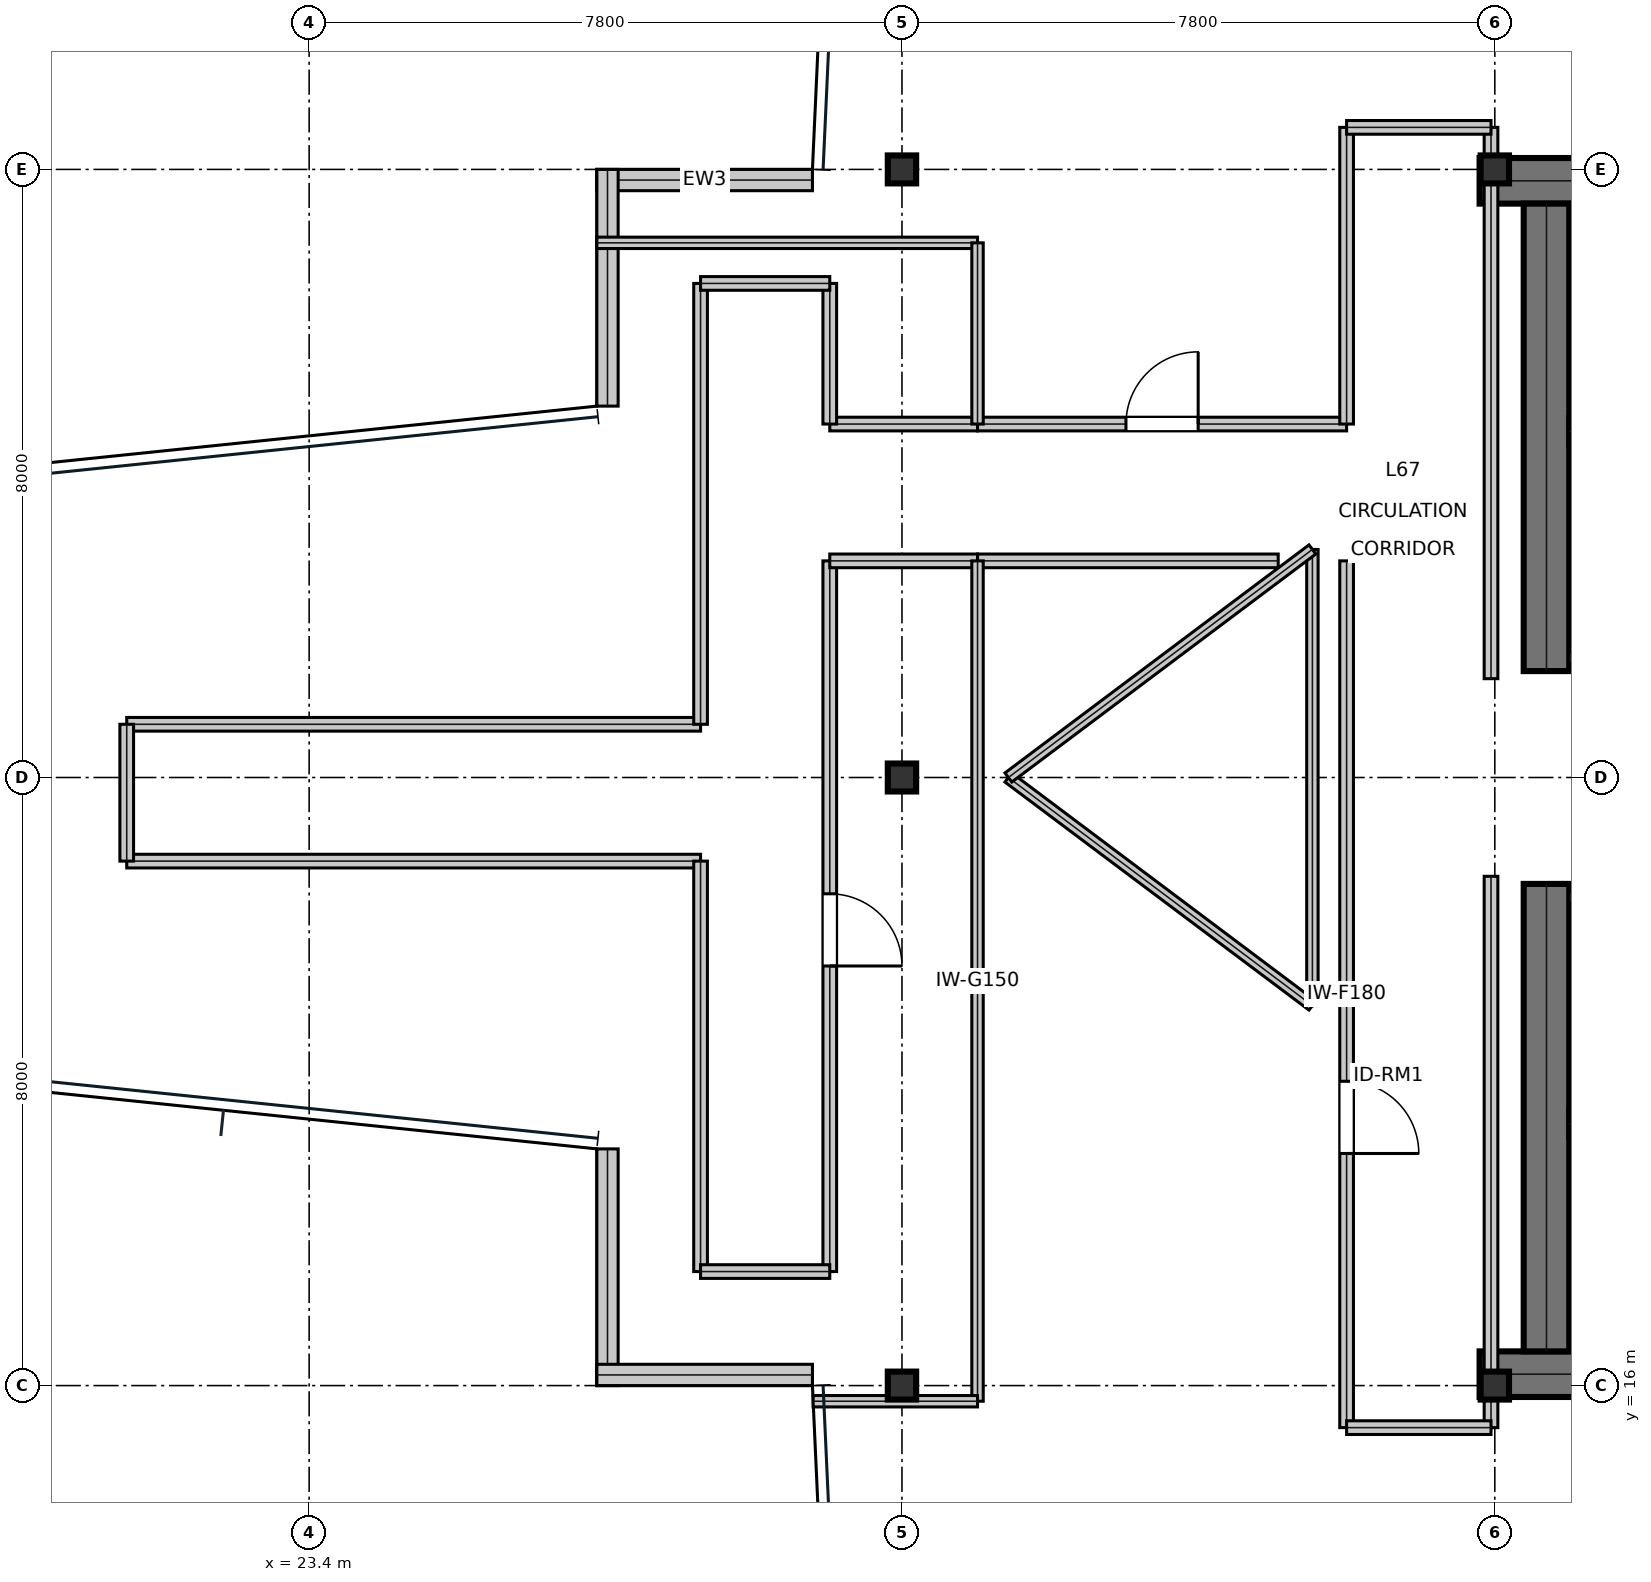
"""IFC4 building model, lengths in metres.
Left out: names, types, materials, properties, quantities, classifications, styles, units other than length and angle.
Written with IfcOpenShell. Run it as: python <this file> out.ifc"""

import sys

from ifc_helpers import new_model, si_unit, direction, frame, frame_2d, origin, origin_2d, place, context, subcontext, project, spatial, rectangle, i_section, extrude, element, fill, save


model = new_model("IFC4")
c1 = context("Model", 3, precision=1e-05, world=origin(), true_north=direction((0.0, 1.0)))
c2 = subcontext(c1, "Body", "Model", "MODEL_VIEW")
j1 = project(units=[si_unit("LENGTHUNIT", "METRE"), si_unit("PLANEANGLEUNIT", "RADIAN")], contexts=[c1])
p1 = place(None, origin())
s1 = spatial("IfcSite", under=j1, at=p1, CompositionType="ELEMENT")
p2 = place(p1, origin())
s2 = spatial("IfcBuilding", under=s1, at=p2, CompositionType="ELEMENT")
p3 = place(p2, frame((0.0, 0.0, 287.1)))
s3 = spatial("IfcBuildingStorey", under=s2, at=p3, CompositionType="ELEMENT", Elevation=287.1)
for number, where, z_axis, x_axis in (
    (1, (38.8, 31.85, 0.0), (0.0, 0.0, 1.0), (1.0, 0.0, 0.0)),
    (2, (38.8, 16.15, 0.0), (0.0, 0.0, 1.0), (1.0, 0.0, 0.0)),
):
    element("IfcWall", number, at=place(p3, frame(where, z_axis=z_axis, x_axis=x_axis)), inside=s3, PredefinedType="SHEAR", context=c2, shape_type="SweptSolid", body=[
        extrude(rectangle(XDim=16.0, YDim=0.6, at=frame_2d((8.0, 0.0))), origin(), (0.0, 0.0, 1.0), 3.81),
    ])
for number, where, z_axis, x_axis in (
    (3, (39.68, 16.45, 0.0), (0.0, 0.0, 1.0), (0.0, 1.0, 0.0)),
    (4, (39.68, 25.4, 0.0), (0.0, 0.0, 1.0), (0.0, 1.0, 0.0)),
):
    element("IfcWall", number, at=place(p3, frame(where, z_axis=z_axis, x_axis=x_axis)), inside=s3, PredefinedType="SHEAR", context=c2, shape_type="SweptSolid", body=[
        extrude(rectangle(XDim=6.15, YDim=0.6, at=frame_2d((3.075, 0.0))), origin(), (0.0, 0.0, 1.0), 3.81),
    ])
p4 = place(p3, frame((39.98, 28.555, 0.0), z_axis=(0.0, 0.0, 1.0), x_axis=(1.0, 0.0, 0.0)))
e5 = element("IfcWall", 5, at=p4, inside=s3, PredefinedType="SHEAR", context=c2, shape_type="SweptSolid", body=[
    extrude(rectangle(XDim=7.71, YDim=0.35, at=frame_2d((3.855, 0.0))), origin(), (0.0, 0.0, 1.0), 3.81),
])
p5 = place(p4, frame((0.25, 0.0, 0.0)))
e6 = element("IfcOpeningElement", 6, at=p5, cuts=e5, PredefinedType="OPENING", context=c2, shape_type="SweptSolid", body=[
    extrude(rectangle(XDim=1.1, YDim=2.15, at=frame_2d((0.55, 1.075))), frame((0.0, 0.185, 0.0), z_axis=(0.0, -1.0, 0.0), x_axis=(1.0, 0.0, 0.0)), (0.0, 0.0, 1.0), 0.37),
])
p6 = place(p3, frame((39.98, 19.445, 0.0), z_axis=(0.0, 0.0, 1.0), x_axis=(1.0, 0.0, 0.0)))
e7 = element("IfcWall", 7, at=p6, inside=s3, PredefinedType="SHEAR", context=c2, shape_type="SweptSolid", body=[
    extrude(rectangle(XDim=7.71, YDim=0.35, at=frame_2d((3.855, 0.0))), origin(), (0.0, 0.0, 1.0), 3.81),
])
p7 = place(p6, frame((0.25, 0.0, 0.0)))
e8 = element("IfcOpeningElement", 8, at=p7, cuts=e7, PredefinedType="OPENING", context=c2, shape_type="SweptSolid", body=[
    extrude(rectangle(XDim=1.1, YDim=2.15, at=frame_2d((0.55, 1.075))), frame((0.0, 0.185, 0.0), z_axis=(0.0, -1.0, 0.0), x_axis=(1.0, 0.0, 0.0)), (0.0, 0.0, 1.0), 0.37),
])
for number, where, z_axis, x_axis in (
    (9, (31.2, 16.0, 0.0), (0.0, 0.0, 1.0), (1.0, 0.0, 0.0)),
    (10, (31.2, 24.0, 0.0), (0.0, 0.0, 1.0), (1.0, 0.0, 0.0)),
    (11, (31.2, 32.0, 0.0), (0.0, 0.0, 1.0), (1.0, 0.0, 0.0)),
    (12, (39.0, 16.0, 0.0), (0.0, 0.0, 1.0), (1.0, 0.0, 0.0)),
    (13, (39.0, 32.0, 0.0), (0.0, 0.0, 1.0), (1.0, 0.0, 0.0)),
):
    element("IfcColumn", number, at=place(p3, frame(where, z_axis=z_axis, x_axis=x_axis)), inside=s3, PredefinedType="COLUMN", context=c2, shape_type="SweptSolid", body=[
        extrude(i_section(OverallWidth=0.373, OverallDepth=0.368, WebThickness=0.015, FlangeThickness=0.024, at=origin_2d()), origin(), (0.0, 0.0, 1.0), 4.044),
    ])
p8 = place(p3, frame((30.022, 31.86, 0.0), z_axis=(0.0, 0.0, 1.0), x_axis=(-1.0, 0.0, 0.0)))
e14 = element("IfcWall", 14, at=p8, inside=s3, PredefinedType="STANDARD", context=c2, shape_type="SweptSolid", body=[
    extrude(rectangle(XDim=2.836, YDim=0.28, at=frame_2d((1.418, 0.0))), origin(), (0.0, 0.0, 1.0), 3.81),
])
for number, where, z_axis, x_axis in (
    (15, (27.326, 32.0, 0.0), (0.0, 0.0, 1.0), (0.0, -1.0, 0.0)),
    (16, (27.326, 19.114, 0.0), (0.0, 0.0, 1.0), (0.0, -1.0, 0.0)),
):
    element("IfcWall", number, at=place(p3, frame(where, z_axis=z_axis, x_axis=x_axis)), inside=s3, PredefinedType="STANDARD", context=c2, shape_type="SweptSolid", body=[
        extrude(rectangle(XDim=3.114, YDim=0.28, at=frame_2d((1.557, 0.0))), origin(), (0.0, 0.0, 1.0), 3.339),
    ])
p9 = place(p3, frame((27.186, 16.14, 0.0), z_axis=(0.0, 0.0, 1.0), x_axis=(1.0, 0.0, 0.0)))
e17 = element("IfcWall", 17, at=p9, inside=s3, PredefinedType="STANDARD", context=c2, shape_type="SweptSolid", body=[
    extrude(rectangle(XDim=2.836, YDim=0.28, at=frame_2d((1.418, 0.0))), origin(), (0.0, 0.0, 1.0), 3.81),
])
p10 = place(p3, frame((39.98, 25.575, 0.0), z_axis=(0.0, 0.0, 1.0), x_axis=(1.0, 0.0, 0.0)))
e18 = element("IfcWall", 18, at=p10, inside=s3, PredefinedType="PARTITIONING", context=c2, shape_type="SweptSolid", body=[
    extrude(rectangle(XDim=5.9, YDim=0.15, at=frame_2d((2.95, 0.0))), origin(), (0.0, 0.0, 1.0), 3.81),
])
p11 = place(p10, frame((2.35, 0.0, 0.0)))
e19 = element("IfcOpeningElement", 19, at=p11, cuts=e18, PredefinedType="OPENING", context=c2, shape_type="SweptSolid", body=[
    extrude(rectangle(XDim=1.05, YDim=2.15, at=frame_2d((0.525, 1.075))), frame((0.0, 0.085, 0.0), z_axis=(0.0, -1.0, 0.0), x_axis=(1.0, 0.0, 0.0)), (0.0, 0.0, 1.0), 0.17),
])
p12 = place(p3, frame((39.98, 22.425, 0.0), z_axis=(0.0, 0.0, 1.0), x_axis=(1.0, 0.0, 0.0)))
e20 = element("IfcWall", 20, at=p12, inside=s3, PredefinedType="PARTITIONING", context=c2, shape_type="SweptSolid", body=[
    extrude(rectangle(XDim=5.9, YDim=0.15, at=frame_2d((2.95, 0.0))), origin(), (0.0, 0.0, 1.0), 3.81),
])
p13 = place(p12, frame((2.35, 0.0, 0.0)))
e21 = element("IfcOpeningElement", 21, at=p13, cuts=e20, PredefinedType="OPENING", context=c2, shape_type="SweptSolid", body=[
    extrude(rectangle(XDim=1.05, YDim=2.15, at=frame_2d((0.525, 1.075))), frame((0.0, 0.085, 0.0), z_axis=(0.0, -1.0, 0.0), x_axis=(1.0, 0.0, 0.0)), (0.0, 0.0, 1.0), 0.17),
])
p14 = place(p3, frame((37.05, 15.447, 0.0), z_axis=(0.0, 0.0, 1.0), x_axis=(0.0, 1.0, 0.0)))
e22 = element("IfcWall", 22, at=p14, inside=s3, PredefinedType="SOLIDWALL", context=c2, shape_type="SweptSolid", body=[
    extrude(rectangle(XDim=11.403, YDim=0.18, at=frame_2d((5.702, 0.0))), origin(), (0.0, 0.0, 1.0), 3.27),
])
p15 = place(p14, frame((3.607, 0.0, 0.0)))
e23 = element("IfcOpeningElement", 23, at=p15, cuts=e22, PredefinedType="OPENING", context=c2, shape_type="SweptSolid", body=[
    extrude(rectangle(XDim=0.95, YDim=2.15, at=frame_2d((0.475, 1.075))), frame((0.0, 0.1, 0.0), z_axis=(0.0, -1.0, 0.0), x_axis=(1.0, 0.0, 0.0)), (0.0, 0.0, 1.0), 0.2),
])
p16 = place(p3, frame((30.25, 17.5, 0.0), z_axis=(0.0, 0.0, 1.0), x_axis=(0.0, 1.0, 0.0)))
e24 = element("IfcWall", 24, at=p16, inside=s3, PredefinedType="SOLIDWALL", context=c2, shape_type="SweptSolid", body=[
    extrude(rectangle(XDim=9.35, YDim=0.18, at=frame_2d((4.675, 0.0))), origin(), (0.0, 0.0, 1.0), 3.27),
])
p17 = place(p16, frame((4.02, 0.0, 0.0)))
e25 = element("IfcOpeningElement", 25, at=p17, cuts=e24, PredefinedType="OPENING", context=c2, shape_type="SweptSolid", body=[
    extrude(rectangle(XDim=0.95, YDim=2.15, at=frame_2d((0.475, 1.075))), frame((0.0, 0.1, 0.0), z_axis=(0.0, -1.0, 0.0), x_axis=(1.0, 0.0, 0.0)), (0.0, 0.0, 1.0), 0.2),
])
p18 = place(p3, frame((32.194, 28.65, 0.0), z_axis=(0.0, 0.0, 1.0), x_axis=(1.0, 0.0, 0.0)))
e26 = element("IfcWall", 26, at=p18, inside=s3, PredefinedType="SOLIDWALL", context=c2, shape_type="SweptSolid", body=[
    extrude(rectangle(XDim=4.856, YDim=0.18, at=frame_2d((2.428, 0.0))), origin(), (0.0, 0.0, 1.0), 3.81),
])
p19 = place(p18, frame((1.953, 0.0, 0.0)))
e27 = element("IfcOpeningElement", 27, at=p19, cuts=e26, PredefinedType="OPENING", context=c2, shape_type="SweptSolid", body=[
    extrude(rectangle(XDim=0.95, YDim=2.15, at=frame_2d((0.475, 1.075))), frame((0.0, 0.1, 0.0), z_axis=(0.0, -1.0, 0.0), x_axis=(1.0, 0.0, 0.0)), (0.0, 0.0, 1.0), 0.2),
])
p20 = place(p3, frame((38.95, 15.447, 0.0), z_axis=(0.0, 0.0, 1.0), x_axis=(0.0, 1.0, 0.0)))
e28 = element("IfcWall", 28, at=p20, inside=s3, PredefinedType="SOLIDWALL", context=c2, shape_type="SweptSolid", body=[
    extrude(rectangle(XDim=7.253, YDim=0.18, at=frame_2d((3.626, 0.0))), origin(), (0.0, 0.0, 1.0), 3.27),
])
p21 = place(p3, frame((32.194, 26.85, 0.0), z_axis=(0.0, 0.0, 1.0), x_axis=(1.0, 0.0, 0.0)))
e29 = element("IfcWall", 29, at=p21, inside=s3, PredefinedType="SOLIDWALL", context=c2, shape_type="SweptSolid", body=[
    extrude(rectangle(XDim=3.956, YDim=0.18, at=frame_2d((1.978, 0.0))), origin(), (0.0, 0.0, 1.0), 3.81),
])
p22 = place(p3, frame((37.05, 15.447, 0.0), z_axis=(0.0, 0.0, 1.0), x_axis=(1.0, 0.0, 0.0)))
e30 = element("IfcWall", 30, at=p22, inside=s3, PredefinedType="SOLIDWALL", context=c2, shape_type="SweptSolid", body=[
    extrude(rectangle(XDim=1.9, YDim=0.18, at=frame_2d((0.95, 0.0))), origin(), (0.0, 0.0, 1.0), 3.27),
])
for number, where, z_axis, x_axis in (
    (31, (21.0, 22.9, 0.0), (0.0, 0.0, 1.0), (1.0, 0.0, 0.0)),
    (32, (21.0, 24.7, 0.0), (0.0, 0.0, 1.0), (1.0, 0.0, 0.0)),
):
    element("IfcWall", number, at=place(p3, frame(where, z_axis=z_axis, x_axis=x_axis)), inside=s3, PredefinedType="SOLIDWALL", context=c2, shape_type="SweptSolid", body=[
        extrude(rectangle(XDim=7.55, YDim=0.18, at=frame_2d((3.775, 0.0))), origin(), (0.0, 0.0, 1.0), 3.27),
    ])
p23 = place(p3, frame((28.55, 24.7, 0.0), z_axis=(0.0, 0.0, 1.0), x_axis=(0.0, 1.0, 0.0)))
e33 = element("IfcWall", 33, at=p23, inside=s3, PredefinedType="SOLIDWALL", context=c2, shape_type="SweptSolid", body=[
    extrude(rectangle(XDim=5.8, YDim=0.18, at=frame_2d((2.9, 0.0))), origin(), (0.0, 0.0, 1.0), 3.81),
])
p24 = place(p3, frame((28.55, 17.5, 0.0), z_axis=(0.0, 0.0, 1.0), x_axis=(0.0, 1.0, 0.0)))
e34 = element("IfcWall", 34, at=p24, inside=s3, PredefinedType="SOLIDWALL", context=c2, shape_type="SweptSolid", body=[
    extrude(rectangle(XDim=5.4, YDim=0.18, at=frame_2d((2.7, 0.0))), origin(), (0.0, 0.0, 1.0), 3.81),
])
for number, where, z_axis, x_axis in (
    (35, (30.25, 26.85, 0.0), (0.0, 0.0, 1.0), (1.0, 0.0, 0.0)),
    (36, (30.25, 28.65, 0.0), (0.0, 0.0, 1.0), (1.0, 0.0, 0.0)),
):
    element("IfcWall", number, at=place(p3, frame(where, z_axis=z_axis, x_axis=x_axis)), inside=s3, PredefinedType="SOLIDWALL", context=c2, shape_type="SweptSolid", body=[
        extrude(rectangle(XDim=1.944, YDim=0.18, at=frame_2d((0.972, 0.0))), origin(), (0.0, 0.0, 1.0), 3.27),
    ])
p25 = place(p3, frame((30.25, 28.65, 0.0), z_axis=(0.0, 0.0, 1.0), x_axis=(0.0, 1.0, 0.0)))
e37 = element("IfcWall", 37, at=p25, inside=s3, PredefinedType="SOLIDWALL", context=c2, shape_type="SweptSolid", body=[
    extrude(rectangle(XDim=1.85, YDim=0.18, at=frame_2d((0.925, 0.0))), origin(), (0.0, 0.0, 1.0), 3.81),
])
p26 = place(p3, frame((21.0, 22.9, 0.0), z_axis=(0.0, 0.0, 1.0), x_axis=(0.0, 1.0, 0.0)))
e38 = element("IfcWall", 38, at=p26, inside=s3, PredefinedType="SOLIDWALL", context=c2, shape_type="SweptSolid", body=[
    extrude(rectangle(XDim=1.8, YDim=0.18, at=frame_2d((0.9, 0.0))), origin(), (0.0, 0.0, 1.0), 3.81),
])
for number, where, z_axis, x_axis in (
    (39, (28.55, 17.5, 0.0), (0.0, 0.0, 1.0), (1.0, 0.0, 0.0)),
    (40, (28.55, 30.5, 0.0), (0.0, 0.0, 1.0), (1.0, 0.0, 0.0)),
):
    element("IfcWall", number, at=place(p3, frame(where, z_axis=z_axis, x_axis=x_axis)), inside=s3, PredefinedType="SOLIDWALL", context=c2, shape_type="SweptSolid", body=[
        extrude(rectangle(XDim=1.7, YDim=0.18, at=frame_2d((0.85, 0.0))), origin(), (0.0, 0.0, 1.0), 3.81),
    ])
p27 = place(p3, frame((38.95, 25.3, 0.0), z_axis=(0.0, 0.0, 1.0), x_axis=(0.0, 1.0, 0.0)))
e41 = element("IfcWall", 41, at=p27, inside=s3, PredefinedType="SOLIDWALL", context=c2, shape_type="SweptSolid", body=[
    extrude(rectangle(XDim=7.253, YDim=0.18, at=frame_2d((3.626, 0.0))), origin(), (0.0, 0.0, 1.0), 3.27),
])
p28 = place(p3, frame((37.05, 28.65, 0.0), z_axis=(0.0, 0.0, 1.0), x_axis=(0.0, 1.0, 0.0)))
e42 = element("IfcWall", 42, at=p28, inside=s3, PredefinedType="SOLIDWALL", context=c2, shape_type="SweptSolid", body=[
    extrude(rectangle(XDim=3.903, YDim=0.18, at=frame_2d((1.952, 0.0))), origin(), (0.0, 0.0, 1.0), 3.27),
])
p29 = place(p3, frame((37.05, 32.553, 0.0), z_axis=(0.0, 0.0, 1.0), x_axis=(1.0, 0.0, 0.0)))
e43 = element("IfcWall", 43, at=p29, inside=s3, PredefinedType="SOLIDWALL", context=c2, shape_type="SweptSolid", body=[
    extrude(rectangle(XDim=1.9, YDim=0.18, at=frame_2d((0.95, 0.0))), origin(), (0.0, 0.0, 1.0), 3.27),
])
p30 = place(p3, frame((32.194, 15.794, 0.0), z_axis=(0.0, 0.0, 1.0), x_axis=(0.0, 1.0, 0.0)))
e44 = element("IfcWall", 44, at=p30, inside=s3, PredefinedType="MOVABLE", context=c2, shape_type="SweptSolid", body=[
    extrude(rectangle(XDim=11.056, YDim=0.15, at=frame_2d((5.528, 0.0))), origin(), (0.0, 0.0, 1.0), 3.27),
])
p31 = place(p3, frame((30.031, 15.794, 0.0), z_axis=(0.0, 0.0, 1.0), x_axis=(1.0, 0.0, 0.0)))
e45 = element("IfcWall", 45, at=p31, inside=s3, PredefinedType="MOVABLE", context=c2, shape_type="SweptSolid", body=[
    extrude(rectangle(XDim=2.163, YDim=0.15, at=frame_2d((1.081, 0.0))), origin(), (0.0, 0.0, 1.0), 3.27),
])
p32 = place(p3, frame((27.186, 31.034, 0.0), z_axis=(0.0, 0.0, 1.0), x_axis=(1.0, 0.0, 0.0)))
e46 = element("IfcWall", 46, at=p32, inside=s3, PredefinedType="MOVABLE", context=c2, shape_type="SweptSolid", body=[
    extrude(rectangle(XDim=5.009, YDim=0.15, at=frame_2d((2.504, 0.0))), origin(), (0.0, 0.0, 1.0), 3.27),
])
p33 = place(p3, frame((32.194, 28.65, 0.0), z_axis=(0.0, 0.0, 1.0), x_axis=(0.0, 1.0, 0.0)))
e47 = element("IfcWall", 47, at=p33, inside=s3, PredefinedType="MOVABLE", context=c2, shape_type="SweptSolid", body=[
    extrude(rectangle(XDim=2.384, YDim=0.15, at=frame_2d((1.192, 0.0))), origin(), (0.0, 0.0, 1.0), 3.54),
])
p34 = place(p3, frame((32.6, 24.0, 0.0), z_axis=(0.0, 0.0, 1.0), x_axis=(0.8, -0.6, 0.0)))
e48 = element("IfcWall", 48, at=p34, inside=s3, PredefinedType="MOVABLE", context=c2, shape_type="SweptSolid", body=[
    extrude(rectangle(XDim=5.0, YDim=0.15, at=frame_2d((2.5, 0.0))), origin(), (0.0, 0.0, 1.0), 3.81),
])
p35 = place(p3, frame((36.6, 21.0, 0.0), z_axis=(0.0, 0.0, 1.0), x_axis=(0.0, 1.0, 0.0)))
e49 = element("IfcWall", 49, at=p35, inside=s3, PredefinedType="MOVABLE", context=c2, shape_type="SweptSolid", body=[
    extrude(rectangle(XDim=6.0, YDim=0.15, at=frame_2d((3.0, 0.0))), origin(), (0.0, 0.0, 1.0), 3.81),
])
p36 = place(p3, frame((36.6, 27.0, 0.0), z_axis=(0.0, 0.0, 1.0), x_axis=(-0.8, -0.6, 0.0)))
e50 = element("IfcWall", 50, at=p36, inside=s3, PredefinedType="MOVABLE", context=c2, shape_type="SweptSolid", body=[
    extrude(rectangle(XDim=5.0, YDim=0.15, at=frame_2d((2.5, 0.0))), origin(), (0.0, 0.0, 1.0), 3.81),
])
p37 = place(p15, frame((0.95, 0.0, 0.0), z_axis=(0.0, 0.0, 1.0), x_axis=(-1.0, 0.0, 0.0)))
e51 = element("IfcDoor", 51, at=p37, inside=s3, OperationType="SINGLE_SWING_RIGHT", PredefinedType="DOOR", context=c2, shape_type="SweptSolid", body=[
    extrude(rectangle(XDim=0.95, YDim=2.15, at=frame_2d((0.475, 1.075))), frame((0.0, 0.025, 0.0), z_axis=(0.0, -1.0, 0.0), x_axis=(1.0, 0.0, 0.0)), (0.0, 0.0, 1.0), 0.05),
])
fill(e23, e51)
p38 = place(p17, frame((0.95, 0.0, 0.0), z_axis=(0.0, 0.0, 1.0), x_axis=(-1.0, 0.0, 0.0)))
e52 = element("IfcDoor", 52, at=p38, inside=s3, OperationType="SINGLE_SWING_RIGHT", PredefinedType="DOOR", context=c2, shape_type="SweptSolid", body=[
    extrude(rectangle(XDim=0.95, YDim=2.15, at=frame_2d((0.475, 1.075))), frame((0.0, 0.025, 0.0), z_axis=(0.0, -1.0, 0.0), x_axis=(1.0, 0.0, 0.0)), (0.0, 0.0, 1.0), 0.05),
])
fill(e25, e52)
p39 = place(p19, origin())
e53 = element("IfcDoor", 53, at=p39, inside=s3, OperationType="SINGLE_SWING_RIGHT", PredefinedType="DOOR", context=c2, shape_type="SweptSolid", body=[
    extrude(rectangle(XDim=0.95, YDim=2.15, at=frame_2d((0.475, 1.075))), frame((0.0, 0.025, 0.0), z_axis=(0.0, -1.0, 0.0), x_axis=(1.0, 0.0, 0.0)), (0.0, 0.0, 1.0), 0.05),
])
fill(e27, e53)
save(model, sys.argv[1])
